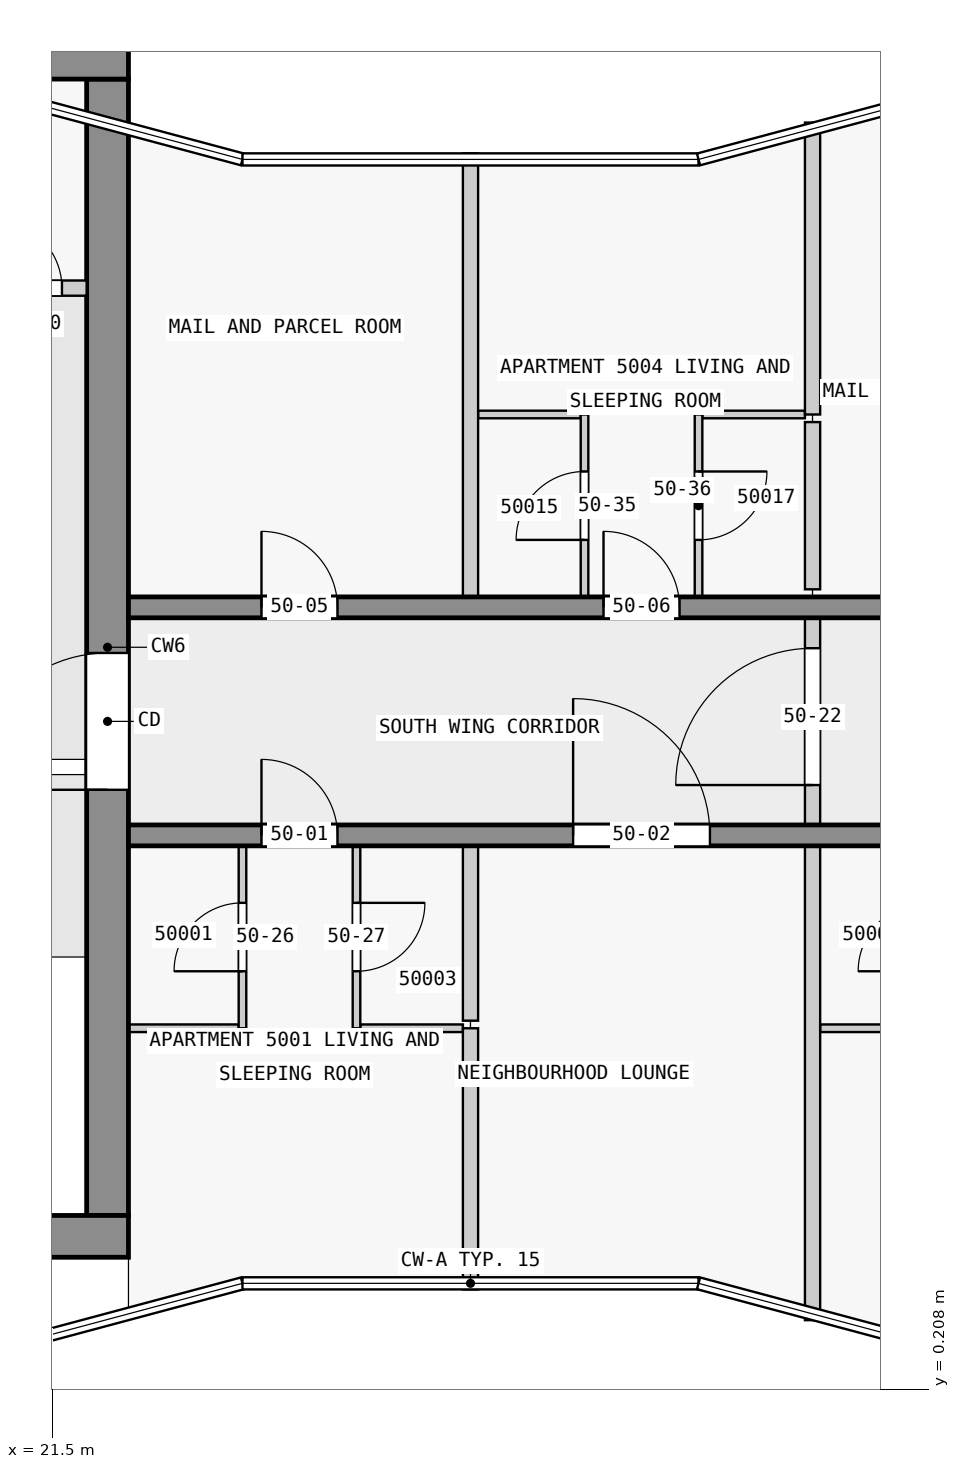
"""IFC4 building model, lengths in metres.
Left out: names, types, materials, properties, quantities, classifications, styles, units other than length and angle.
Written with IfcOpenShell. Run it as: python <this file> out.ifc"""

import sys

from ifc_helpers import new_model, si_unit, direction, frame, frame_2d, origin, place, context, subcontext, project, spatial, rectangle, extrude, element, fill, save


model = new_model("IFC4")
c1 = context("Model", 3, precision=1e-05, world=origin(), true_north=direction((0.0, 1.0)))
c2 = subcontext(c1, "Body", "Model", "MODEL_VIEW")
j1 = project(units=[si_unit("LENGTHUNIT", "METRE"), si_unit("PLANEANGLEUNIT", "RADIAN")], contexts=[c1])
p1 = place(None, origin())
s1 = spatial("IfcSite", under=j1, at=p1, CompositionType="ELEMENT")
p2 = place(p1, origin())
s2 = spatial("IfcBuilding", under=s1, at=p2, CompositionType="ELEMENT")
p3 = place(p2, frame((0.0, 0.0, 194.4)))
s3 = spatial("IfcBuildingStorey", under=s2, at=p3, CompositionType="ELEMENT", Elevation=194.4)
p4 = place(p3, frame((1.75, 2.225, 0.0), z_axis=(0.0, 0.0, 1.0), x_axis=(1.0, 0.0, 0.0)))
e1 = element("IfcWall", 1, at=p4, inside=s3, PredefinedType="SHEAR", context=c2, shape_type="SweptSolid", body=[
    extrude(rectangle(XDim=20.75, YDim=0.55, at=frame_2d((10.375, 0.0))), origin(), (0.0, 0.0, 1.0), 3.25),
])
p5 = place(p3, frame((1.38, 17.725, 0.0), z_axis=(0.0, 0.0, 1.0), x_axis=(1.0, 0.0, 0.0)))
e2 = element("IfcWall", 2, at=p5, inside=s3, PredefinedType="SHEAR", context=c2, shape_type="SweptSolid", body=[
    extrude(rectangle(XDim=21.12, YDim=0.55, at=frame_2d((10.56, 0.0))), origin(), (0.0, 0.0, 1.0), 3.25),
])
p6 = place(p5, frame((6.35, 0.0, 0.0)))
e3 = element("IfcOpeningElement", 3, at=p6, cuts=e2, PredefinedType="OPENING", context=c2, shape_type="SweptSolid", body=[
    extrude(rectangle(XDim=1.8, YDim=2.1, at=frame_2d((0.9, 1.05))), frame((0.0, 0.285, 0.0), z_axis=(0.0, -1.0, 0.0), x_axis=(1.0, 0.0, 0.0)), (0.0, 0.0, 1.0), 0.57),
])
p7 = place(p3, frame((22.225, 2.5, 0.0), z_axis=(0.0, 0.0, 1.0), x_axis=(0.0, 1.0, 0.0)))
e4 = element("IfcWall", 4, at=p7, inside=s3, PredefinedType="SHEAR", context=c2, shape_type="SweptSolid", body=[
    extrude(rectangle(XDim=14.95, YDim=0.55, at=frame_2d((7.475, 0.0))), origin(), (0.0, 0.0, 1.0), 3.25),
])
p8 = place(p7, frame((5.6, 0.0, 0.0)))
e5 = element("IfcOpeningElement", 5, at=p8, cuts=e4, PredefinedType="OPENING", context=c2, shape_type="SweptSolid", body=[
    extrude(rectangle(XDim=1.8, YDim=2.1, at=frame_2d((0.9, 1.05))), frame((0.0, 0.285, 0.0), z_axis=(0.0, -1.0, 0.0), x_axis=(1.0, 0.0, 0.0)), (0.0, 0.0, 1.0), 0.57),
])
p9 = place(p3, frame((22.5, 7.5, 0.0), z_axis=(0.0, 0.0, 1.0), x_axis=(1.0, 0.0, 0.0)))
e6 = element("IfcWall", 6, at=p9, inside=s3, PredefinedType="SHEAR", context=c2, shape_type="SweptSolid", body=[
    extrude(rectangle(XDim=22.5, YDim=0.275, at=frame_2d((11.25, 0.0))), origin(), (0.0, 0.0, 1.0), 3.25),
])
p10 = place(p9, frame((1.75, 0.0, 0.0)))
e7 = element("IfcOpeningElement", 7, at=p10, cuts=e6, PredefinedType="OPENING", context=c2, shape_type="SweptSolid", body=[
    extrude(rectangle(XDim=1.0, YDim=2.1, at=frame_2d((0.5, 1.05))), frame((0.0, 0.147, 0.0), z_axis=(0.0, -1.0, 0.0), x_axis=(1.0, 0.0, 0.0)), (0.0, 0.0, 1.0), 0.295),
])
p11 = place(p9, frame((5.85, 0.0, 0.0)))
e8 = element("IfcOpeningElement", 8, at=p11, cuts=e6, PredefinedType="OPENING", context=c2, shape_type="SweptSolid", body=[
    extrude(rectangle(XDim=1.8, YDim=2.1, at=frame_2d((0.9, 1.05))), frame((0.0, 0.147, 0.0), z_axis=(0.0, -1.0, 0.0), x_axis=(1.0, 0.0, 0.0)), (0.0, 0.0, 1.0), 0.295),
])
p12 = place(p9, frame((10.75, 0.0, 0.0)))
e9 = element("IfcOpeningElement", 9, at=p12, cuts=e6, PredefinedType="OPENING", context=c2, shape_type="SweptSolid", body=[
    extrude(rectangle(XDim=1.0, YDim=2.1, at=frame_2d((0.5, 1.05))), frame((0.0, 0.147, 0.0), z_axis=(0.0, -1.0, 0.0), x_axis=(1.0, 0.0, 0.0)), (0.0, 0.0, 1.0), 0.295),
])
p13 = place(p9, frame((16.85, 0.0, 0.0)))
e10 = element("IfcOpeningElement", 10, at=p13, cuts=e6, PredefinedType="OPENING", context=c2, shape_type="SweptSolid", body=[
    extrude(rectangle(XDim=1.0, YDim=2.1, at=frame_2d((0.5, 1.05))), frame((0.0, 0.147, 0.0), z_axis=(0.0, -1.0, 0.0), x_axis=(1.0, 0.0, 0.0)), (0.0, 0.0, 1.0), 0.295),
])
p14 = place(p3, frame((22.5, 10.5, 0.0), z_axis=(0.0, 0.0, 1.0), x_axis=(1.0, 0.0, 0.0)))
e11 = element("IfcWall", 11, at=p14, inside=s3, PredefinedType="SHEAR", context=c2, shape_type="SweptSolid", body=[
    extrude(rectangle(XDim=22.5, YDim=0.275, at=frame_2d((11.25, 0.0))), origin(), (0.0, 0.0, 1.0), 3.25),
])
p15 = place(p14, frame((1.75, 0.0, 0.0)))
e12 = element("IfcOpeningElement", 12, at=p15, cuts=e11, PredefinedType="OPENING", context=c2, shape_type="SweptSolid", body=[
    extrude(rectangle(XDim=1.0, YDim=2.1, at=frame_2d((0.5, 1.05))), frame((0.0, 0.147, 0.0), z_axis=(0.0, -1.0, 0.0), x_axis=(1.0, 0.0, 0.0)), (0.0, 0.0, 1.0), 0.295),
])
p16 = place(p14, frame((6.25, 0.0, 0.0)))
e13 = element("IfcOpeningElement", 13, at=p16, cuts=e11, PredefinedType="OPENING", context=c2, shape_type="SweptSolid", body=[
    extrude(rectangle(XDim=1.0, YDim=2.1, at=frame_2d((0.5, 1.05))), frame((0.0, 0.147, 0.0), z_axis=(0.0, -1.0, 0.0), x_axis=(1.0, 0.0, 0.0)), (0.0, 0.0, 1.0), 0.295),
])
p17 = place(p14, frame((10.75, 0.0, 0.0)))
e14 = element("IfcOpeningElement", 14, at=p17, cuts=e11, PredefinedType="OPENING", context=c2, shape_type="SweptSolid", body=[
    extrude(rectangle(XDim=1.0, YDim=2.1, at=frame_2d((0.5, 1.05))), frame((0.0, 0.147, 0.0), z_axis=(0.0, -1.0, 0.0), x_axis=(1.0, 0.0, 0.0)), (0.0, 0.0, 1.0), 0.295),
])
p18 = place(p14, frame((15.25, 0.0, 0.0)))
e15 = element("IfcOpeningElement", 15, at=p18, cuts=e11, PredefinedType="OPENING", context=c2, shape_type="SweptSolid", body=[
    extrude(rectangle(XDim=1.0, YDim=2.1, at=frame_2d((0.5, 1.05))), frame((0.0, 0.147, 0.0), z_axis=(0.0, -1.0, 0.0), x_axis=(1.0, 0.0, 0.0)), (0.0, 0.0, 1.0), 0.295),
])
p19 = place(p14, frame((18.75, 0.0, 0.0)))
e16 = element("IfcOpeningElement", 16, at=p19, cuts=e11, PredefinedType="OPENING", context=c2, shape_type="SweptSolid", body=[
    extrude(rectangle(XDim=0.9, YDim=2.1, at=frame_2d((0.45, 1.05))), frame((0.0, 0.147, 0.0), z_axis=(0.0, -1.0, 0.0), x_axis=(1.0, 0.0, 0.0)), (0.0, 0.0, 1.0), 0.295),
])
p20 = place(p14, frame((20.95, 0.0, 0.0)))
e17 = element("IfcOpeningElement", 17, at=p20, cuts=e11, PredefinedType="OPENING", context=c2, shape_type="SweptSolid", body=[
    extrude(rectangle(XDim=1.0, YDim=2.1, at=frame_2d((0.5, 1.05))), frame((0.0, 0.147, 0.0), z_axis=(0.0, -1.0, 0.0), x_axis=(1.0, 0.0, 0.0)), (0.0, 0.0, 1.0), 0.295),
])
p21 = place(p3, frame((18.6, 14.7, 0.0), z_axis=(0.0, 0.0, 1.0), x_axis=(1.0, 0.0, 0.0)))
e18 = element("IfcWall", 18, at=p21, inside=s3, PredefinedType="PARTITIONING", context=c2, shape_type="SweptSolid", body=[
    extrude(rectangle(XDim=3.35, YDim=0.2, at=frame_2d((1.675, 0.0))), origin(), (0.0, 0.0, 1.0), 3.25),
])
p22 = place(p21, frame((0.45, 0.0, 0.0)))
e19 = element("IfcOpeningElement", 19, at=p22, cuts=e18, PredefinedType="OPENING", context=c2, shape_type="SweptSolid", body=[
    extrude(rectangle(XDim=0.9, YDim=2.1, at=frame_2d((0.45, 1.05))), frame((0.0, 0.11, 0.0), z_axis=(0.0, -1.0, 0.0), x_axis=(1.0, 0.0, 0.0)), (0.0, 0.0, 1.0), 0.22),
])
p23 = place(p21, frame((2.125, 0.0, 0.0)))
e20 = element("IfcOpeningElement", 20, at=p23, cuts=e18, PredefinedType="OPENING", context=c2, shape_type="SweptSolid", body=[
    extrude(rectangle(XDim=0.9, YDim=2.1, at=frame_2d((0.45, 1.05))), frame((0.0, 0.11, 0.0), z_axis=(0.0, -1.0, 0.0), x_axis=(1.0, 0.0, 0.0)), (0.0, 0.0, 1.0), 0.22),
])
p24 = place(p3, frame((22.5, 4.962, 0.0), z_axis=(0.0, 0.0, 1.0), x_axis=(1.0, 0.0, 0.0)))
e21 = element("IfcWall", 21, at=p24, inside=s3, PredefinedType="PARTITIONING", context=c2, shape_type="SweptSolid", body=[
    extrude(rectangle(XDim=1.45, YDim=0.1, at=frame_2d((0.725, 0.0))), origin(), (0.0, 0.0, 1.0), 3.25),
])
for number, where, z_axis, x_axis in (
    (22, (25.55, 4.962, 0.0), (0.0, 0.0, 1.0), (1.0, 0.0, 0.0)),
    (23, (31.6, 4.962, 0.0), (0.0, 0.0, 1.0), (1.0, 0.0, 0.0)),
    (24, (28.45, 13.038, 0.0), (0.0, 0.0, 1.0), (-1.0, 0.0, 0.0)),
    (25, (31.4, 13.038, 0.0), (0.0, 0.0, 1.0), (-1.0, 0.0, 0.0)),
):
    element("IfcWall", number, at=place(p3, frame(where, z_axis=z_axis, x_axis=x_axis)), inside=s3, PredefinedType="PARTITIONING", context=c2, shape_type="SweptSolid", body=[
        extrude(rectangle(XDim=1.35, YDim=0.1, at=frame_2d((0.675, 0.0))), origin(), (0.0, 0.0, 1.0), 3.25),
    ])
p25 = place(p3, frame((24.0, 4.962, 0.0), z_axis=(0.0, 0.0, 1.0), x_axis=(0.0, 1.0, 0.0)))
e26 = element("IfcWall", 26, at=p25, inside=s3, PredefinedType="PARTITIONING", context=c2, shape_type="SweptSolid", body=[
    extrude(rectangle(XDim=2.4, YDim=0.1, at=frame_2d((1.2, 0.0))), origin(), (0.0, 0.0, 1.0), 3.25),
])
p26 = place(p25, frame((0.75, 0.0, 0.0)))
e27 = element("IfcOpeningElement", 27, at=p26, cuts=e26, PredefinedType="OPENING", context=c2, shape_type="SweptSolid", body=[
    extrude(rectangle(XDim=0.9, YDim=2.1, at=frame_2d((0.45, 1.05))), frame((0.0, 0.06, 0.0), z_axis=(0.0, -1.0, 0.0), x_axis=(1.0, 0.0, 0.0)), (0.0, 0.0, 1.0), 0.12),
])
p27 = place(p3, frame((25.5, 7.363, 0.0), z_axis=(0.0, 0.0, 1.0), x_axis=(0.0, -1.0, 0.0)))
e28 = element("IfcWall", 28, at=p27, inside=s3, PredefinedType="PARTITIONING", context=c2, shape_type="SweptSolid", body=[
    extrude(rectangle(XDim=2.4, YDim=0.1, at=frame_2d((1.2, 0.0))), origin(), (0.0, 0.0, 1.0), 3.25),
])
p28 = place(p27, frame((0.75, 0.0, 0.0)))
e29 = element("IfcOpeningElement", 29, at=p28, cuts=e28, PredefinedType="OPENING", context=c2, shape_type="SweptSolid", body=[
    extrude(rectangle(XDim=0.9, YDim=2.1, at=frame_2d((0.45, 1.05))), frame((0.0, 0.06, 0.0), z_axis=(0.0, -1.0, 0.0), x_axis=(1.0, 0.0, 0.0)), (0.0, 0.0, 1.0), 0.12),
])
p29 = place(p3, frame((27.0, 4.962, 0.0), z_axis=(0.0, 0.0, 1.0), x_axis=(0.0, -1.0, 0.0)))
e30 = element("IfcWall", 30, at=p29, inside=s3, PredefinedType="PARTITIONING", context=c2, shape_type="SweptSolid", body=[
    extrude(rectangle(XDim=3.436, YDim=0.2, at=frame_2d((1.718, 0.0))), origin(), (0.0, 0.0, 1.0), 3.25),
])
p30 = place(p3, frame((27.0, 5.062, 0.0), z_axis=(0.0, 0.0, 1.0), x_axis=(0.0, 1.0, 0.0)))
e31 = element("IfcWall", 31, at=p30, inside=s3, PredefinedType="PARTITIONING", context=c2, shape_type="SweptSolid", body=[
    extrude(rectangle(XDim=2.3, YDim=0.2, at=frame_2d((1.15, 0.0))), origin(), (0.0, 0.0, 1.0), 3.25),
])
p31 = place(p3, frame((27.0, 10.637, 0.0), z_axis=(0.0, 0.0, 1.0), x_axis=(0.0, 1.0, 0.0)))
e32 = element("IfcWall", 32, at=p31, inside=s3, PredefinedType="PARTITIONING", context=c2, shape_type="SweptSolid", body=[
    extrude(rectangle(XDim=5.836, YDim=0.2, at=frame_2d((2.918, 0.0))), origin(), (0.0, 0.0, 1.0), 3.25),
])
p32 = place(p3, frame((28.5, 10.637, 0.0), z_axis=(0.0, 0.0, 1.0), x_axis=(0.0, 1.0, 0.0)))
e33 = element("IfcWall", 33, at=p32, inside=s3, PredefinedType="PARTITIONING", context=c2, shape_type="SweptSolid", body=[
    extrude(rectangle(XDim=2.4, YDim=0.1, at=frame_2d((1.2, 0.0))), origin(), (0.0, 0.0, 1.0), 3.25),
])
p33 = place(p32, frame((0.75, 0.0, 0.0)))
e34 = element("IfcOpeningElement", 34, at=p33, cuts=e33, PredefinedType="OPENING", context=c2, shape_type="SweptSolid", body=[
    extrude(rectangle(XDim=0.9, YDim=2.1, at=frame_2d((0.45, 1.05))), frame((0.0, 0.06, 0.0), z_axis=(0.0, -1.0, 0.0), x_axis=(1.0, 0.0, 0.0)), (0.0, 0.0, 1.0), 0.12),
])
p34 = place(p3, frame((30.0, 13.038, 0.0), z_axis=(0.0, 0.0, 1.0), x_axis=(0.0, -1.0, 0.0)))
e35 = element("IfcWall", 35, at=p34, inside=s3, PredefinedType="PARTITIONING", context=c2, shape_type="SweptSolid", body=[
    extrude(rectangle(XDim=2.4, YDim=0.1, at=frame_2d((1.2, 0.0))), origin(), (0.0, 0.0, 1.0), 3.25),
])
p35 = place(p34, frame((0.75, 0.0, 0.0)))
e36 = element("IfcOpeningElement", 36, at=p35, cuts=e35, PredefinedType="OPENING", context=c2, shape_type="SweptSolid", body=[
    extrude(rectangle(XDim=0.9, YDim=2.1, at=frame_2d((0.45, 1.05))), frame((0.0, 0.06, 0.0), z_axis=(0.0, -1.0, 0.0), x_axis=(1.0, 0.0, 0.0)), (0.0, 0.0, 1.0), 0.12),
])
p36 = place(p3, frame((31.5, 16.878, 0.0), z_axis=(0.0, 0.0, 1.0), x_axis=(0.0, -1.0, 0.0)))
e37 = element("IfcWall", 37, at=p36, inside=s3, PredefinedType="PARTITIONING", context=c2, shape_type="SweptSolid", body=[
    extrude(rectangle(XDim=3.84, YDim=0.2, at=frame_2d((1.92, 0.0))), origin(), (0.0, 0.0, 1.0), 3.25),
])
p37 = place(p3, frame((31.5, 1.122, 0.0), z_axis=(0.0, 0.0, 1.0), x_axis=(0.0, 1.0, 0.0)))
e38 = element("IfcWall", 38, at=p37, inside=s3, PredefinedType="PARTITIONING", context=c2, shape_type="SweptSolid", body=[
    extrude(rectangle(XDim=6.24, YDim=0.2, at=frame_2d((3.12, 0.0))), origin(), (0.0, 0.0, 1.0), 3.25),
])
p38 = place(p3, frame((31.5, 10.738, 0.0), z_axis=(0.0, 0.0, 1.0), x_axis=(0.0, 1.0, 0.0)))
e39 = element("IfcWall", 39, at=p38, inside=s3, PredefinedType="PARTITIONING", context=c2, shape_type="SweptSolid", body=[
    extrude(rectangle(XDim=2.2, YDim=0.2, at=frame_2d((1.1, 0.0))), origin(), (0.0, 0.0, 1.0), 3.25),
])
p39 = place(p3, frame((31.5, 7.462, 0.0), z_axis=(0.0, 0.0, 1.0), x_axis=(0.0, 1.0, 0.0)))
e40 = element("IfcWall", 40, at=p39, inside=s3, PredefinedType="PARTITIONING", context=c2, shape_type="SweptSolid", body=[
    extrude(rectangle(XDim=3.175, YDim=0.2, at=frame_2d((1.587, 0.0))), origin(), (0.0, 0.0, 1.0), 3.25),
])
p40 = place(p39, frame((0.7, 0.0, 0.0)))
e41 = element("IfcOpeningElement", 41, at=p40, cuts=e40, PredefinedType="OPENING", context=c2, shape_type="SweptSolid", body=[
    extrude(rectangle(XDim=1.8, YDim=2.1, at=frame_2d((0.9, 1.05))), frame((0.0, 0.11, 0.0), z_axis=(0.0, -1.0, 0.0), x_axis=(1.0, 0.0, 0.0)), (0.0, 0.0, 1.0), 0.22),
])
p41 = place(p8, origin())
e42 = element("IfcDoor", 42, at=p41, inside=s3, OperationType="DOUBLE_DOOR_SINGLE_SWING", PredefinedType="DOOR", context=c2, shape_type="SweptSolid", body=[
    extrude(rectangle(XDim=1.8, YDim=2.1, at=frame_2d((0.9, 1.05))), frame((0.0, 0.025, 0.0), z_axis=(0.0, -1.0, 0.0), x_axis=(1.0, 0.0, 0.0)), (0.0, 0.0, 1.0), 0.05),
])
fill(e5, e42)
p42 = place(p23, origin())
e43 = element("IfcDoor", 43, at=p42, inside=s3, OperationType="SINGLE_SWING_LEFT", PredefinedType="DOOR", context=c2, shape_type="SweptSolid", body=[
    extrude(rectangle(XDim=0.9, YDim=2.1, at=frame_2d((0.45, 1.05))), frame((0.0, 0.025, 0.0), z_axis=(0.0, -1.0, 0.0), x_axis=(1.0, 0.0, 0.0)), (0.0, 0.0, 1.0), 0.05),
])
fill(e20, e43)
p43 = place(p10, origin())
e44 = element("IfcDoor", 44, at=p43, inside=s3, OperationType="SINGLE_SWING_LEFT", PredefinedType="DOOR", context=c2, shape_type="SweptSolid", body=[
    extrude(rectangle(XDim=1.0, YDim=2.1, at=frame_2d((0.5, 1.05))), frame((0.0, 0.025, 0.0), z_axis=(0.0, -1.0, 0.0), x_axis=(1.0, 0.0, 0.0)), (0.0, 0.0, 1.0), 0.05),
])
fill(e7, e44)
p44 = place(p11, origin())
e45 = element("IfcDoor", 45, at=p44, inside=s3, OperationType="SINGLE_SWING_LEFT", PredefinedType="DOOR", context=c2, shape_type="SweptSolid", body=[
    extrude(rectangle(XDim=1.8, YDim=2.1, at=frame_2d((0.9, 1.05))), frame((0.0, 0.025, 0.0), z_axis=(0.0, -1.0, 0.0), x_axis=(1.0, 0.0, 0.0)), (0.0, 0.0, 1.0), 0.05),
])
fill(e8, e45)
p45 = place(p15, origin())
e46 = element("IfcDoor", 46, at=p45, inside=s3, OperationType="SINGLE_SWING_LEFT", PredefinedType="DOOR", context=c2, shape_type="SweptSolid", body=[
    extrude(rectangle(XDim=1.0, YDim=2.1, at=frame_2d((0.5, 1.05))), frame((0.0, 0.025, 0.0), z_axis=(0.0, -1.0, 0.0), x_axis=(1.0, 0.0, 0.0)), (0.0, 0.0, 1.0), 0.05),
])
fill(e12, e46)
p46 = place(p16, origin())
e47 = element("IfcDoor", 47, at=p46, inside=s3, OperationType="SINGLE_SWING_LEFT", PredefinedType="DOOR", context=c2, shape_type="SweptSolid", body=[
    extrude(rectangle(XDim=1.0, YDim=2.1, at=frame_2d((0.5, 1.05))), frame((0.0, 0.025, 0.0), z_axis=(0.0, -1.0, 0.0), x_axis=(1.0, 0.0, 0.0)), (0.0, 0.0, 1.0), 0.05),
])
fill(e13, e47)
p47 = place(p40, origin())
e48 = element("IfcDoor", 48, at=p47, inside=s3, OperationType="SINGLE_SWING_RIGHT", PredefinedType="DOOR", context=c2, shape_type="SweptSolid", body=[
    extrude(rectangle(XDim=1.8, YDim=2.1, at=frame_2d((0.9, 1.05))), frame((0.0, 0.025, 0.0), z_axis=(0.0, -1.0, 0.0), x_axis=(1.0, 0.0, 0.0)), (0.0, 0.0, 1.0), 0.05),
])
fill(e41, e48)
p48 = place(p26, origin())
e49 = element("IfcDoor", 49, at=p48, inside=s3, OperationType="SINGLE_SWING_RIGHT", PredefinedType="DOOR", context=c2, shape_type="SweptSolid", body=[
    extrude(rectangle(XDim=0.9, YDim=2.1, at=frame_2d((0.45, 1.05))), frame((0.0, 0.025, 0.0), z_axis=(0.0, -1.0, 0.0), x_axis=(1.0, 0.0, 0.0)), (0.0, 0.0, 1.0), 0.05),
])
fill(e27, e49)
p49 = place(p28, origin())
e50 = element("IfcDoor", 50, at=p49, inside=s3, OperationType="SINGLE_SWING_RIGHT", PredefinedType="DOOR", context=c2, shape_type="SweptSolid", body=[
    extrude(rectangle(XDim=0.9, YDim=2.1, at=frame_2d((0.45, 1.05))), frame((0.0, 0.025, 0.0), z_axis=(0.0, -1.0, 0.0), x_axis=(1.0, 0.0, 0.0)), (0.0, 0.0, 1.0), 0.05),
])
fill(e29, e50)
p50 = place(p33, origin())
e51 = element("IfcDoor", 51, at=p50, inside=s3, OperationType="SINGLE_SWING_LEFT", PredefinedType="DOOR", context=c2, shape_type="SweptSolid", body=[
    extrude(rectangle(XDim=0.9, YDim=2.1, at=frame_2d((0.45, 1.05))), frame((0.0, 0.025, 0.0), z_axis=(0.0, -1.0, 0.0), x_axis=(1.0, 0.0, 0.0)), (0.0, 0.0, 1.0), 0.05),
])
fill(e34, e51)
p51 = place(p35, origin())
e52 = element("IfcDoor", 52, at=p51, inside=s3, OperationType="SINGLE_SWING_LEFT", PredefinedType="DOOR", context=c2, shape_type="SweptSolid", body=[
    extrude(rectangle(XDim=0.9, YDim=2.1, at=frame_2d((0.45, 1.05))), frame((0.0, 0.025, 0.0), z_axis=(0.0, -1.0, 0.0), x_axis=(1.0, 0.0, 0.0)), (0.0, 0.0, 1.0), 0.05),
])
fill(e36, e52)
save(model, sys.argv[1])
